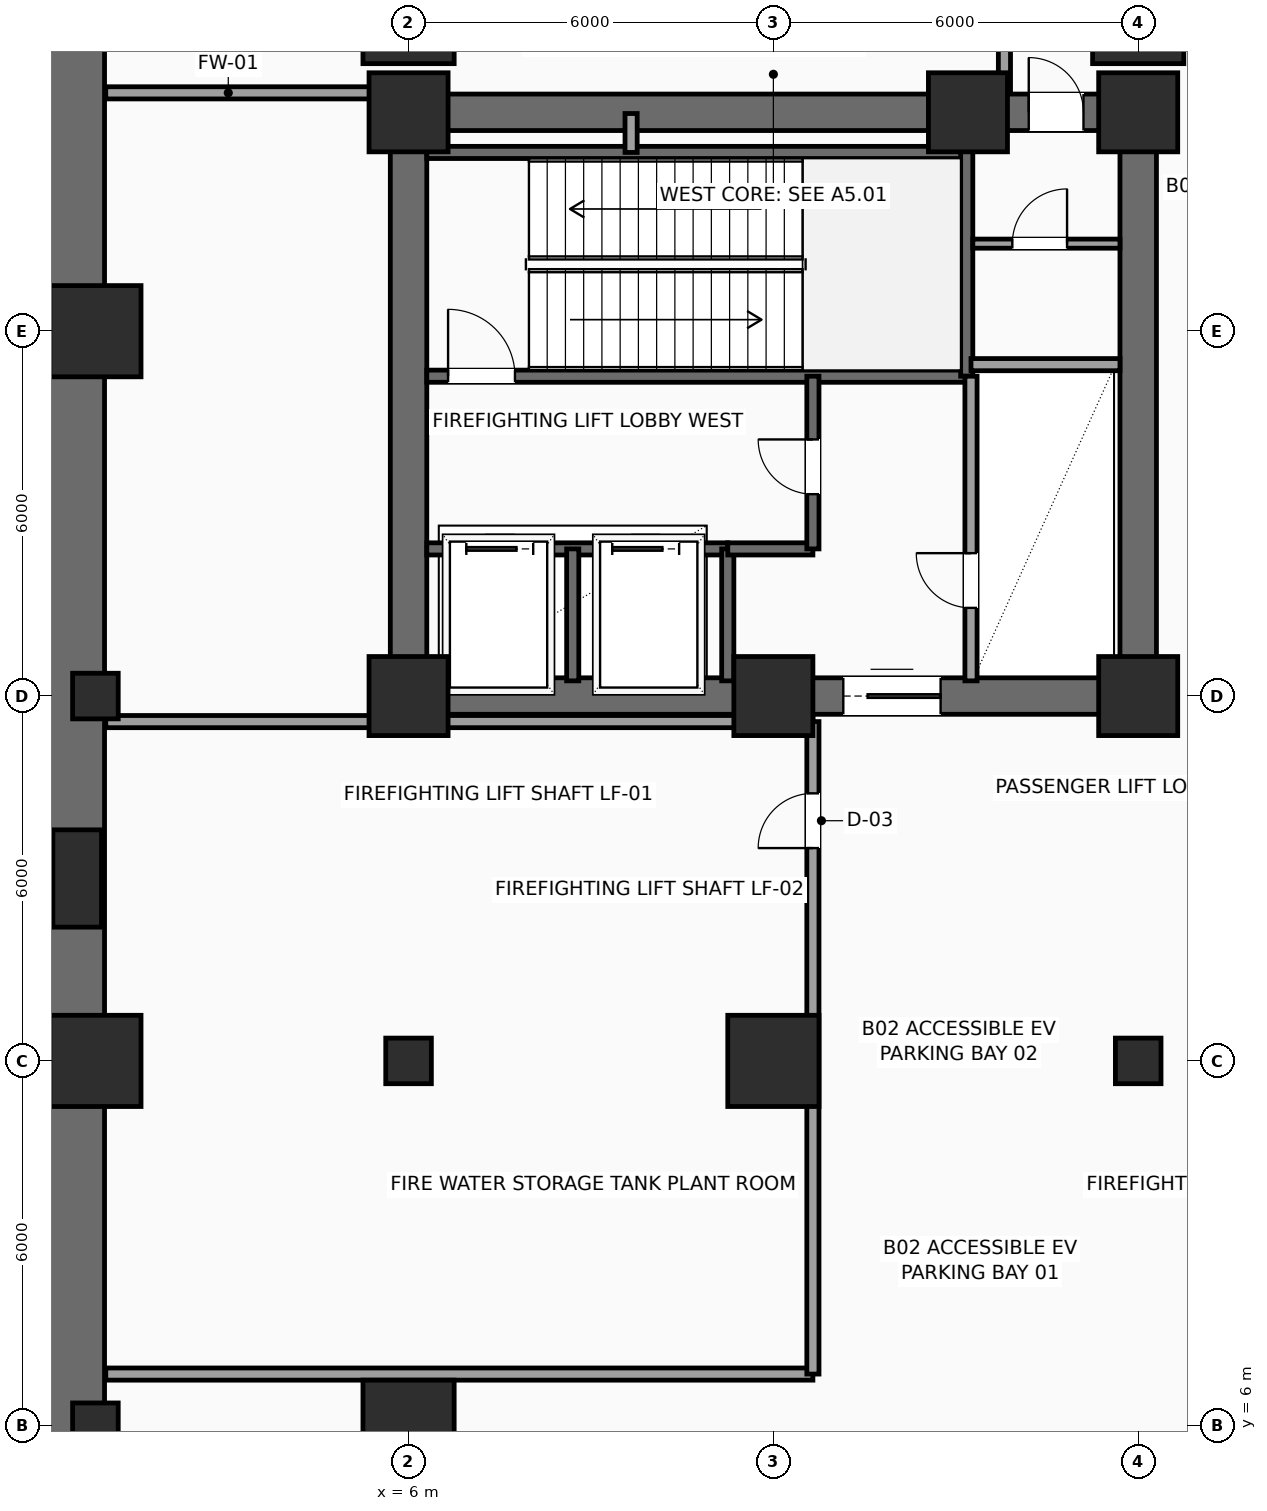
"""IFC4 building model, lengths in metres.
Left out: names, types, materials, properties, quantities, classifications, styles, units other than length and angle.
Written with IfcOpenShell. Run it as: python <this file> out.ifc"""

import sys

from ifc_helpers import new_model, si_unit, direction, frame, frame_2d, origin, origin_2d, place, context, subcontext, project, spatial, rectangle, hollow_rectangle, extrude, element, fill, save


model = new_model("IFC4")
c1 = context("Model", 3, precision=1e-05, world=origin(), true_north=direction((0.0, 1.0)))
c2 = subcontext(c1, "Body", "Model", "MODEL_VIEW")
j1 = project(units=[si_unit("LENGTHUNIT", "METRE"), si_unit("PLANEANGLEUNIT", "RADIAN")], contexts=[c1])
p1 = place(None, origin())
s1 = spatial("IfcSite", under=j1, at=p1, CompositionType="ELEMENT")
p2 = place(p1, origin())
s2 = spatial("IfcBuilding", under=s1, at=p2, CompositionType="ELEMENT")
p3 = place(p2, frame((0.0, 0.0, -9.6)))
s3 = spatial("IfcBuildingStorey", under=s2, at=p3, CompositionType="ELEMENT", Elevation=-9.6)
for number, where, z_axis, x_axis in (
    (1, (6.0, 18.0, 0.0), (0.0, 0.0, 1.0), (1.0, 0.0, 0.0)),
    (2, (12.0, 18.0, 0.0), (0.0, 0.0, 1.0), (1.0, 0.0, 0.0)),
    (3, (18.0, 18.0, 0.0), (0.0, 0.0, 1.0), (1.0, 0.0, 0.0)),
    (4, (6.0, 27.6, 0.0), (0.0, 0.0, 1.0), (1.0, 0.0, 0.0)),
    (5, (15.2, 27.6, 0.0), (0.0, 0.0, 1.0), (1.0, 0.0, 0.0)),
    (6, (18.0, 27.6, 0.0), (0.0, 0.0, 1.0), (1.0, 0.0, 0.0)),
):
    element("IfcColumn", number, at=place(p3, frame(where, z_axis=z_axis, x_axis=x_axis)), inside=s3, PredefinedType="COLUMN", context=c2, shape_type="SweptSolid", body=[
        extrude(rectangle(XDim=1.3, YDim=1.3, at=origin_2d()), origin(), (0.0, 0.0, 1.0), 4.8),
    ])
p4 = place(p3, frame((0.85, 6.0, 0.0), z_axis=(0.0, 0.0, 1.0), x_axis=(1.0, 0.0, 0.0)))
e7 = element("IfcColumn", 7, at=p4, inside=s3, PredefinedType="COLUMN", context=c2, shape_type="SweptSolid", body=[
    extrude(hollow_rectangle(XDim=0.75, YDim=0.75, WallThickness=0.035, InnerFilletRadius=0.035, OuterFilletRadius=0.05, at=origin_2d()), origin(), (0.0, 0.0, 1.0), 4.8),
])
p5 = place(p3, frame((0.85, 12.0, 0.0), z_axis=(0.0, 0.0, 1.0), x_axis=(1.0, 0.0, 0.0)))
e8 = element("IfcColumn", 8, at=p5, inside=s3, PredefinedType="COLUMN", context=c2, shape_type="SweptSolid", body=[
    extrude(rectangle(XDim=1.5, YDim=1.5, at=origin_2d()), origin(), (0.0, 0.0, 1.0), 4.8),
])
p6 = place(p3, frame((0.85, 18.0, 0.0), z_axis=(0.0, 0.0, 1.0), x_axis=(1.0, 0.0, 0.0)))
e9 = element("IfcColumn", 9, at=p6, inside=s3, PredefinedType="COLUMN", context=c2, shape_type="SweptSolid", body=[
    extrude(hollow_rectangle(XDim=0.75, YDim=0.75, WallThickness=0.035, InnerFilletRadius=0.035, OuterFilletRadius=0.05, at=origin_2d()), origin(), (0.0, 0.0, 1.0), 4.8),
])
for number, where, z_axis, x_axis in (
    (10, (0.85, 24.0, 0.0), (0.0, 0.0, 1.0), (1.0, 0.0, 0.0)),
    (11, (6.0, 6.0, 0.0), (0.0, 0.0, 1.0), (1.0, 0.0, 0.0)),
):
    element("IfcColumn", number, at=place(p3, frame(where, z_axis=z_axis, x_axis=x_axis)), inside=s3, PredefinedType="COLUMN", context=c2, shape_type="SweptSolid", body=[
        extrude(rectangle(XDim=1.5, YDim=1.5, at=origin_2d()), origin(), (0.0, 0.0, 1.0), 4.8),
    ])
p7 = place(p3, frame((6.0, 12.0, 0.0), z_axis=(0.0, 0.0, 1.0), x_axis=(1.0, 0.0, 0.0)))
e12 = element("IfcColumn", 12, at=p7, inside=s3, PredefinedType="COLUMN", context=c2, shape_type="SweptSolid", body=[
    extrude(hollow_rectangle(XDim=0.75, YDim=0.75, WallThickness=0.035, InnerFilletRadius=0.035, OuterFilletRadius=0.05, at=origin_2d()), origin(), (0.0, 0.0, 1.0), 4.8),
])
for number, where, z_axis, x_axis in (
    (13, (6.0, 29.15, 0.0), (0.0, 0.0, 1.0), (1.0, 0.0, 0.0)),
    (14, (12.0, 12.0, 0.0), (0.0, 0.0, 1.0), (1.0, 0.0, 0.0)),
):
    element("IfcColumn", number, at=place(p3, frame(where, z_axis=z_axis, x_axis=x_axis)), inside=s3, PredefinedType="COLUMN", context=c2, shape_type="SweptSolid", body=[
        extrude(rectangle(XDim=1.5, YDim=1.5, at=origin_2d()), origin(), (0.0, 0.0, 1.0), 4.8),
    ])
p8 = place(p3, frame((18.0, 12.0, 0.0), z_axis=(0.0, 0.0, 1.0), x_axis=(1.0, 0.0, 0.0)))
e15 = element("IfcColumn", 15, at=p8, inside=s3, PredefinedType="COLUMN", context=c2, shape_type="SweptSolid", body=[
    extrude(hollow_rectangle(XDim=0.75, YDim=0.75, WallThickness=0.035, InnerFilletRadius=0.035, OuterFilletRadius=0.05, at=origin_2d()), origin(), (0.0, 0.0, 1.0), 4.8),
])
p9 = place(p3, frame((18.0, 29.15, 0.0), z_axis=(0.0, 0.0, 1.0), x_axis=(1.0, 0.0, 0.0)))
e16 = element("IfcColumn", 16, at=p9, inside=s3, PredefinedType="COLUMN", context=c2, shape_type="SweptSolid", body=[
    extrude(rectangle(XDim=1.5, YDim=1.5, at=origin_2d()), origin(), (0.0, 0.0, 1.0), 4.8),
])
p10 = place(p3, frame((0.55, 15.0, 0.0), z_axis=(0.0, 0.0, 1.0), x_axis=(1.0, 0.0, 0.0)))
e17 = element("IfcColumn", 17, at=p10, inside=s3, PredefinedType="COLUMN", context=c2, shape_type="SweptSolid", body=[
    extrude(rectangle(XDim=0.8, YDim=1.6, at=origin_2d()), origin(), (0.0, 0.0, 1.0), 4.8),
])
p11 = place(p3, frame((0.5, 3.0, 0.0), z_axis=(0.0, 0.0, 1.0), x_axis=(0.0, 1.0, 0.0)))
e18 = element("IfcWall", 18, at=p11, inside=s3, PredefinedType="USERDEFINED", context=c2, shape_type="SweptSolid", body=[
    extrude(rectangle(XDim=42.0, YDim=1.0, at=frame_2d((21.0, 0.0))), origin(), (0.0, 0.0, 1.0), 4.475),
])
p12 = place(p3, frame((6.0, 18.0, 0.0), z_axis=(0.0, 0.0, 1.0), x_axis=(1.0, 0.0, 0.0)))
e19 = element("IfcWall", 19, at=p12, inside=s3, PredefinedType="SHEAR", context=c2, shape_type="SweptSolid", body=[
    extrude(rectangle(XDim=12.0, YDim=0.6, at=frame_2d((6.0, 0.0))), origin(), (0.0, 0.0, 1.0), 4.475),
])
p13 = place(p12, frame((7.15, 0.0, 0.0)))
e20 = element("IfcOpeningElement", 20, at=p13, cuts=e19, PredefinedType="OPENING", context=c2, shape_type="SweptSolid", body=[
    extrude(rectangle(XDim=1.6, YDim=2.3, at=frame_2d((0.8, 1.15))), frame((0.0, 0.31, 0.0), z_axis=(0.0, -1.0, 0.0), x_axis=(1.0, 0.0, 0.0)), (0.0, 0.0, 1.0), 0.62),
])
p14 = place(p3, frame((6.0, 27.6, 0.0), z_axis=(0.0, 0.0, 1.0), x_axis=(1.0, 0.0, 0.0)))
e21 = element("IfcWall", 21, at=p14, inside=s3, PredefinedType="SHEAR", context=c2, shape_type="SweptSolid", body=[
    extrude(rectangle(XDim=12.0, YDim=0.6, at=frame_2d((6.0, 0.0))), origin(), (0.0, 0.0, 1.0), 4.475),
])
p15 = place(p14, frame((10.2, 0.0, 0.0)))
e22 = element("IfcOpeningElement", 22, at=p15, cuts=e21, PredefinedType="OPENING", context=c2, shape_type="SweptSolid", body=[
    extrude(rectangle(XDim=0.9, YDim=2.15, at=frame_2d((0.45, 1.075))), frame((0.0, 0.31, 0.0), z_axis=(0.0, -1.0, 0.0), x_axis=(1.0, 0.0, 0.0)), (0.0, 0.0, 1.0), 0.62),
])
for number, where, z_axis, x_axis in (
    (23, (6.0, 18.0, 0.0), (0.0, 0.0, 1.0), (0.0, 1.0, 0.0)),
    (24, (18.0, 18.0, 0.0), (0.0, 0.0, 1.0), (0.0, 1.0, 0.0)),
):
    element("IfcWall", number, at=place(p3, frame(where, z_axis=z_axis, x_axis=x_axis)), inside=s3, PredefinedType="SHEAR", context=c2, shape_type="SweptSolid", body=[
        extrude(rectangle(XDim=9.6, YDim=0.6, at=frame_2d((4.8, 0.0))), origin(), (0.0, 0.0, 1.0), 4.475),
    ])
p16 = place(p3, frame((6.3, 23.26, 0.0), z_axis=(0.0, 0.0, 1.0), x_axis=(1.0, 0.0, 0.0)))
e25 = element("IfcWall", 25, at=p16, inside=s3, PredefinedType="SHEAR", context=c2, shape_type="SweptSolid", body=[
    extrude(rectangle(XDim=8.88, YDim=0.2, at=frame_2d((4.44, 0.0))), origin(), (0.0, 0.0, 1.0), 4.475),
])
p17 = place(p16, frame((0.35, 0.0, 0.0)))
e26 = element("IfcOpeningElement", 26, at=p17, cuts=e25, PredefinedType="OPENING", context=c2, shape_type="SweptSolid", body=[
    extrude(rectangle(XDim=1.1, YDim=2.2, at=frame_2d((0.55, 1.1))), frame((0.0, 0.11, 0.0), z_axis=(0.0, -1.0, 0.0), x_axis=(1.0, 0.0, 0.0)), (0.0, 0.0, 1.0), 0.22),
])
p18 = place(p3, frame((6.3, 26.94, 0.0), z_axis=(0.0, 0.0, 1.0), x_axis=(1.0, 0.0, 0.0)))
e27 = element("IfcWall", 27, at=p18, inside=s3, PredefinedType="SHEAR", context=c2, shape_type="SweptSolid", body=[
    extrude(rectangle(XDim=8.88, YDim=0.2, at=frame_2d((4.44, 0.0))), origin(), (0.0, 0.0, 1.0), 4.475),
])
p19 = place(p3, frame((15.18, 23.26, 0.0), z_axis=(0.0, 0.0, 1.0), x_axis=(0.0, 1.0, 0.0)))
e28 = element("IfcWall", 28, at=p19, inside=s3, PredefinedType="SHEAR", context=c2, shape_type="SweptSolid", body=[
    extrude(rectangle(XDim=4.04, YDim=0.2, at=frame_2d((2.02, 0.0))), origin(), (0.0, 0.0, 1.0), 4.475),
])
p20 = place(p3, frame((6.3, 20.42, 0.0), z_axis=(0.0, 0.0, 1.0), x_axis=(1.0, 0.0, 0.0)))
e29 = element("IfcWall", 29, at=p20, inside=s3, PredefinedType="SHEAR", context=c2, shape_type="SweptSolid", body=[
    extrude(rectangle(XDim=4.95, YDim=0.2, at=frame_2d((2.475, 0.0))), origin(), (0.0, 0.0, 1.0), 4.475),
])
p21 = place(p20, frame((0.65, 0.0, 0.0)))
e30 = element("IfcOpeningElement", 30, at=p21, cuts=e29, PredefinedType="OPENING", context=c2, shape_type="SweptSolid", body=[
    extrude(rectangle(XDim=1.1, YDim=2.2, at=frame_2d((0.55, 1.1))), frame((0.0, 0.11, 0.0), z_axis=(0.0, -1.0, 0.0), x_axis=(1.0, 0.0, 0.0)), (0.0, 0.0, 1.0), 0.22),
])
p22 = place(p20, frame((3.05, 0.0, 0.0)))
e31 = element("IfcOpeningElement", 31, at=p22, cuts=e29, PredefinedType="OPENING", context=c2, shape_type="SweptSolid", body=[
    extrude(rectangle(XDim=1.1, YDim=2.2, at=frame_2d((0.55, 1.1))), frame((0.0, 0.11, 0.0), z_axis=(0.0, -1.0, 0.0), x_axis=(1.0, 0.0, 0.0)), (0.0, 0.0, 1.0), 0.22),
])
for number, where, z_axis, x_axis in (
    (32, (8.7, 18.25, 0.0), (0.0, 0.0, 1.0), (0.0, 1.0, 0.0)),
    (33, (11.25, 18.25, 0.0), (0.0, 0.0, 1.0), (0.0, 1.0, 0.0)),
):
    element("IfcWall", number, at=place(p3, frame(where, z_axis=z_axis, x_axis=x_axis)), inside=s3, PredefinedType="SHEAR", context=c2, shape_type="SweptSolid", body=[
        extrude(rectangle(XDim=2.17, YDim=0.2, at=frame_2d((1.085, 0.0))), origin(), (0.0, 0.0, 1.0), 4.475),
    ])
p23 = place(p3, frame((11.25, 20.42, 0.0), z_axis=(0.0, 0.0, 1.0), x_axis=(1.0, 0.0, 0.0)))
e34 = element("IfcWall", 34, at=p23, inside=s3, PredefinedType="SHEAR", context=c2, shape_type="SweptSolid", body=[
    extrude(rectangle(XDim=1.4, YDim=0.2, at=frame_2d((0.7, 0.0))), origin(), (0.0, 0.0, 1.0), 4.475),
])
p24 = place(p3, frame((12.65, 20.42, 0.0), z_axis=(0.0, 0.0, 1.0), x_axis=(0.0, 1.0, 0.0)))
e35 = element("IfcWall", 35, at=p24, inside=s3, PredefinedType="SHEAR", context=c2, shape_type="SweptSolid", body=[
    extrude(rectangle(XDim=2.84, YDim=0.2, at=frame_2d((1.42, 0.0))), origin(), (0.0, 0.0, 1.0), 4.475),
])
p25 = place(p24, frame((0.9, 0.0, 0.0)))
e36 = element("IfcOpeningElement", 36, at=p25, cuts=e35, PredefinedType="OPENING", context=c2, shape_type="SweptSolid", body=[
    extrude(rectangle(XDim=0.9, YDim=2.15, at=frame_2d((0.45, 1.075))), frame((0.0, 0.11, 0.0), z_axis=(0.0, -1.0, 0.0), x_axis=(1.0, 0.0, 0.0)), (0.0, 0.0, 1.0), 0.22),
])
p26 = place(p3, frame((9.66, 26.94, 0.0), z_axis=(0.0, 0.0, 1.0), x_axis=(0.0, 1.0, 0.0)))
e37 = element("IfcWall", 37, at=p26, inside=s3, PredefinedType="SOLIDWALL", context=c2, shape_type="SweptSolid", body=[
    extrude(rectangle(XDim=0.64, YDim=0.2, at=frame_2d((0.32, 0.0))), origin(), (0.0, 0.0, 1.0), 4.475),
])
p27 = place(p3, frame((15.25, 18.25, 0.0), z_axis=(0.0, 0.0, 1.0), x_axis=(0.0, 1.0, 0.0)))
e38 = element("IfcWall", 38, at=p27, inside=s3, PredefinedType="SOLIDWALL", context=c2, shape_type="SweptSolid", body=[
    extrude(rectangle(XDim=5.01, YDim=0.2, at=frame_2d((2.505, 0.0))), origin(), (0.0, 0.0, 1.0), 4.475),
])
p28 = place(p27, frame((1.2, 0.0, 0.0)))
e39 = element("IfcOpeningElement", 39, at=p28, cuts=e38, PredefinedType="OPENING", context=c2, shape_type="SweptSolid", body=[
    extrude(rectangle(XDim=0.9, YDim=2.15, at=frame_2d((0.45, 1.075))), frame((0.0, 0.11, 0.0), z_axis=(0.0, -1.0, 0.0), x_axis=(1.0, 0.0, 0.0)), (0.0, 0.0, 1.0), 0.22),
])
p29 = place(p3, frame((15.25, 23.45, 0.0), z_axis=(0.0, 0.0, 1.0), x_axis=(1.0, 0.0, 0.0)))
e40 = element("IfcWall", 40, at=p29, inside=s3, PredefinedType="SOLIDWALL", context=c2, shape_type="SweptSolid", body=[
    extrude(rectangle(XDim=2.45, YDim=0.2, at=frame_2d((1.225, 0.0))), origin(), (0.0, 0.0, 1.0), 4.475),
])
p30 = place(p3, frame((15.28, 25.44, 0.0), z_axis=(0.0, 0.0, 1.0), x_axis=(1.0, 0.0, 0.0)))
e41 = element("IfcWall", 41, at=p30, inside=s3, PredefinedType="PARTITIONING", context=c2, shape_type="SweptSolid", body=[
    extrude(rectangle(XDim=2.42, YDim=0.15, at=frame_2d((1.21, 0.0))), origin(), (0.0, 0.0, 1.0), 4.475),
])
p31 = place(p30, frame((0.65, 0.0, 0.0)))
e42 = element("IfcOpeningElement", 42, at=p31, cuts=e41, PredefinedType="OPENING", context=c2, shape_type="SweptSolid", body=[
    extrude(rectangle(XDim=0.9, YDim=2.15, at=frame_2d((0.45, 1.075))), frame((0.0, 0.085, 0.0), z_axis=(0.0, -1.0, 0.0), x_axis=(1.0, 0.0, 0.0)), (0.0, 0.0, 1.0), 0.17),
])
p32 = place(p3, frame((1.02, 27.92, 0.0), z_axis=(0.0, 0.0, 1.0), x_axis=(1.0, 0.0, 0.0)))
e43 = element("IfcWall", 43, at=p32, inside=s3, PredefinedType="SOLIDWALL", context=c2, shape_type="SweptSolid", body=[
    extrude(rectangle(XDim=4.98, YDim=0.2, at=frame_2d((2.49, 0.0))), origin(), (0.0, 0.0, 1.0), 4.475),
])
p33 = place(p3, frame((15.8, 27.92, 0.0), z_axis=(0.0, 0.0, 1.0), x_axis=(0.0, 1.0, 0.0)))
e44 = element("IfcWall", 44, at=p33, inside=s3, PredefinedType="SOLIDWALL", context=c2, shape_type="SweptSolid", body=[
    extrude(rectangle(XDim=16.96, YDim=0.2, at=frame_2d((8.48, 0.0))), origin(), (0.0, 0.0, 1.0), 4.475),
])
p34 = place(p33, frame((2.98, 0.0, 0.0)))
e45 = element("IfcOpeningElement", 45, at=p34, cuts=e44, PredefinedType="OPENING", context=c2, shape_type="SweptSolid", body=[
    extrude(rectangle(XDim=0.9, YDim=2.15, at=frame_2d((0.45, 1.075))), frame((0.0, 0.11, 0.0), z_axis=(0.0, -1.0, 0.0), x_axis=(1.0, 0.0, 0.0)), (0.0, 0.0, 1.0), 0.22),
])
for number, where, z_axis, x_axis in (
    (46, (1.02, 6.85, 0.0), (0.0, 0.0, 1.0), (1.0, 0.0, 0.0)),
    (47, (1.02, 17.58, 0.0), (0.0, 0.0, 1.0), (1.0, 0.0, 0.0)),
):
    element("IfcWall", number, at=place(p3, frame(where, z_axis=z_axis, x_axis=x_axis)), inside=s3, PredefinedType="SOLIDWALL", context=c2, shape_type="SweptSolid", body=[
        extrude(rectangle(XDim=11.63, YDim=0.2, at=frame_2d((5.815, 0.0))), origin(), (0.0, 0.0, 1.0), 4.475),
    ])
p35 = place(p3, frame((12.65, 6.85, 0.0), z_axis=(0.0, 0.0, 1.0), x_axis=(0.0, 1.0, 0.0)))
e48 = element("IfcWall", 48, at=p35, inside=s3, PredefinedType="SOLIDWALL", context=c2, shape_type="SweptSolid", body=[
    extrude(rectangle(XDim=10.73, YDim=0.2, at=frame_2d((5.365, 0.0))), origin(), (0.0, 0.0, 1.0), 4.475),
])
p36 = place(p35, frame((8.65, 0.0, 0.0)))
e49 = element("IfcOpeningElement", 49, at=p36, cuts=e48, PredefinedType="OPENING", context=c2, shape_type="SweptSolid", body=[
    extrude(rectangle(XDim=0.9, YDim=2.15, at=frame_2d((0.45, 1.075))), frame((0.0, 0.11, 0.0), z_axis=(0.0, -1.0, 0.0), x_axis=(1.0, 0.0, 0.0)), (0.0, 0.0, 1.0), 0.22),
])
p37 = place(p13, origin())
e50 = element("IfcDoor", 50, at=p37, inside=s3, OperationType="DOUBLE_DOOR_SLIDING", PredefinedType="DOOR", context=c2, shape_type="SweptSolid", body=[
    extrude(rectangle(XDim=1.6, YDim=2.3, at=frame_2d((0.8, 1.15))), frame((0.0, 0.025, 0.0), z_axis=(0.0, -1.0, 0.0), x_axis=(1.0, 0.0, 0.0)), (0.0, 0.0, 1.0), 0.05),
])
fill(e20, e50)
p38 = place(p15, origin())
e51 = element("IfcDoor", 51, at=p38, inside=s3, OperationType="SINGLE_SWING_LEFT", PredefinedType="DOOR", context=c2, shape_type="SweptSolid", body=[
    extrude(rectangle(XDim=0.9, YDim=2.15, at=frame_2d((0.45, 1.075))), frame((0.0, 0.025, 0.0), z_axis=(0.0, -1.0, 0.0), x_axis=(1.0, 0.0, 0.0)), (0.0, 0.0, 1.0), 0.05),
])
fill(e22, e51)
p39 = place(p17, origin())
e52 = element("IfcDoor", 52, at=p39, inside=s3, OperationType="SINGLE_SWING_LEFT", PredefinedType="DOOR", context=c2, shape_type="SweptSolid", body=[
    extrude(rectangle(XDim=1.1, YDim=2.2, at=frame_2d((0.55, 1.1))), frame((0.0, 0.025, 0.0), z_axis=(0.0, -1.0, 0.0), x_axis=(1.0, 0.0, 0.0)), (0.0, 0.0, 1.0), 0.05),
])
fill(e26, e52)
p40 = place(p21, origin())
e53 = element("IfcDoor", 53, at=p40, inside=s3, OperationType="SLIDING_TO_LEFT", PredefinedType="DOOR", context=c2, shape_type="SweptSolid", body=[
    extrude(rectangle(XDim=1.1, YDim=2.2, at=frame_2d((0.55, 1.1))), frame((0.0, 0.025, 0.0), z_axis=(0.0, -1.0, 0.0), x_axis=(1.0, 0.0, 0.0)), (0.0, 0.0, 1.0), 0.05),
])
fill(e30, e53)
p41 = place(p22, origin())
e54 = element("IfcDoor", 54, at=p41, inside=s3, OperationType="SLIDING_TO_LEFT", PredefinedType="DOOR", context=c2, shape_type="SweptSolid", body=[
    extrude(rectangle(XDim=1.1, YDim=2.2, at=frame_2d((0.55, 1.1))), frame((0.0, 0.025, 0.0), z_axis=(0.0, -1.0, 0.0), x_axis=(1.0, 0.0, 0.0)), (0.0, 0.0, 1.0), 0.05),
])
fill(e31, e54)
p42 = place(p25, origin())
e55 = element("IfcDoor", 55, at=p42, inside=s3, OperationType="SINGLE_SWING_RIGHT", PredefinedType="DOOR", context=c2, shape_type="SweptSolid", body=[
    extrude(rectangle(XDim=0.9, YDim=2.15, at=frame_2d((0.45, 1.075))), frame((0.0, 0.025, 0.0), z_axis=(0.0, -1.0, 0.0), x_axis=(1.0, 0.0, 0.0)), (0.0, 0.0, 1.0), 0.05),
])
fill(e36, e55)
p43 = place(p28, origin())
e56 = element("IfcDoor", 56, at=p43, inside=s3, OperationType="SINGLE_SWING_RIGHT", PredefinedType="DOOR", context=c2, shape_type="SweptSolid", body=[
    extrude(rectangle(XDim=0.9, YDim=2.15, at=frame_2d((0.45, 1.075))), frame((0.0, 0.025, 0.0), z_axis=(0.0, -1.0, 0.0), x_axis=(1.0, 0.0, 0.0)), (0.0, 0.0, 1.0), 0.05),
])
fill(e39, e56)
p44 = place(p31, origin())
e57 = element("IfcDoor", 57, at=p44, inside=s3, OperationType="SINGLE_SWING_RIGHT", PredefinedType="DOOR", context=c2, shape_type="SweptSolid", body=[
    extrude(rectangle(XDim=0.9, YDim=2.15, at=frame_2d((0.45, 1.075))), frame((0.0, 0.025, 0.0), z_axis=(0.0, -1.0, 0.0), x_axis=(1.0, 0.0, 0.0)), (0.0, 0.0, 1.0), 0.05),
])
fill(e42, e57)
p45 = place(p36, origin())
e58 = element("IfcDoor", 58, at=p45, inside=s3, OperationType="SINGLE_SWING_LEFT", PredefinedType="DOOR", context=c2, shape_type="SweptSolid", body=[
    extrude(rectangle(XDim=0.9, YDim=2.15, at=frame_2d((0.45, 1.075))), frame((0.0, 0.025, 0.0), z_axis=(0.0, -1.0, 0.0), x_axis=(1.0, 0.0, 0.0)), (0.0, 0.0, 1.0), 0.05),
])
fill(e49, e58)
save(model, sys.argv[1])
